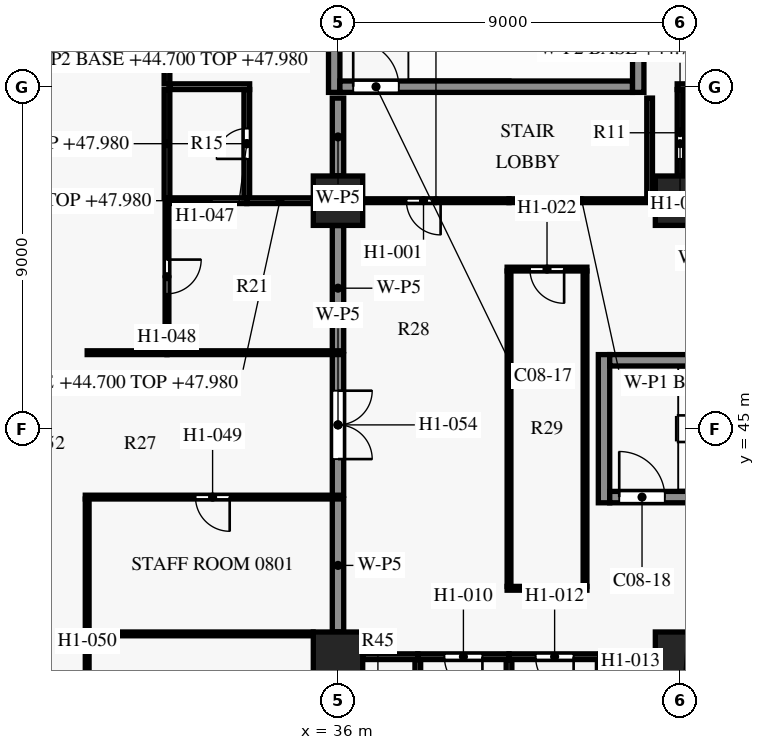
"""IFC4 building model, lengths in metres.
Left out: names, types, materials, properties, quantities, classifications, styles, units other than length and angle.
Written with IfcOpenShell. Run it as: python <this file> out.ifc"""

import sys

from ifc_helpers import new_model, si_unit, direction, frame, frame_2d, origin, origin_2d, place, context, subcontext, project, spatial, rectangle, extrude, element, fill, save


model = new_model("IFC4")
c1 = context("Model", 3, precision=1e-05, world=origin(), true_north=direction((0.0, 1.0)))
c2 = subcontext(c1, "Body", "Model", "MODEL_VIEW")
j1 = project(units=[si_unit("LENGTHUNIT", "METRE"), si_unit("PLANEANGLEUNIT", "RADIAN")], contexts=[c1])
p1 = place(None, origin())
s1 = spatial("IfcSite", under=j1, at=p1, CompositionType="ELEMENT")
p2 = place(p1, origin())
s2 = spatial("IfcBuilding", under=s1, at=p2, CompositionType="ELEMENT")
p3 = place(p2, frame((0.0, 0.0, 44.7)))
s3 = spatial("IfcBuildingStorey", under=s2, at=p3, CompositionType="ELEMENT", Elevation=44.7)
for number, where, z_axis, x_axis in (
    (1, (36.0, 39.0, 0.0), (0.0, 0.0, 1.0), (1.0, 0.0, 0.0)),
    (2, (36.0, 51.0, 0.0), (0.0, 0.0, 1.0), (1.0, 0.0, 0.0)),
    (3, (45.0, 39.0, 0.0), (0.0, 0.0, 1.0), (1.0, 0.0, 0.0)),
    (4, (45.0, 51.0, 0.0), (0.0, 0.0, 1.0), (1.0, 0.0, 0.0)),
):
    element("IfcColumn", number, at=place(p3, frame(where, z_axis=z_axis, x_axis=x_axis)), inside=s3, PredefinedType="COLUMN", context=c2, shape_type="SweptSolid", body=[
        extrude(rectangle(XDim=1.3, YDim=1.3, at=origin_2d()), origin(), (0.0, 0.0, 1.0), 3.6),
    ])
p4 = place(p3, frame((43.15, 43.2, 0.0), z_axis=(0.0, 0.0, 1.0), x_axis=(1.0, 0.0, 0.0)))
e5 = element("IfcWall", 5, at=p4, inside=s3, PredefinedType="SHEAR", context=c2, shape_type="SweptSolid", body=[
    extrude(rectangle(XDim=7.7, YDim=0.3, at=frame_2d((3.85, 0.0))), origin(), (0.0, 0.0, 1.0), 3.3),
])
p5 = place(p4, frame((0.25, 0.0, 0.0)))
e6 = element("IfcOpeningElement", 6, at=p5, cuts=e5, PredefinedType="OPENING", context=c2, shape_type="SweptSolid", body=[
    extrude(rectangle(XDim=1.2, YDim=2.2, at=frame_2d((0.6, 1.1))), frame((0.0, 0.16, 0.0), z_axis=(0.0, -1.0, 0.0), x_axis=(1.0, 0.0, 0.0)), (0.0, 0.0, 1.0), 0.32),
])
p6 = place(p3, frame((43.15, 46.8, 0.0), z_axis=(0.0, 0.0, 1.0), x_axis=(1.0, 0.0, 0.0)))
e7 = element("IfcWall", 7, at=p6, inside=s3, PredefinedType="SHEAR", context=c2, shape_type="SweptSolid", body=[
    extrude(rectangle(XDim=7.7, YDim=0.3, at=frame_2d((3.85, 0.0))), origin(), (0.0, 0.0, 1.0), 3.3),
])
p7 = place(p3, frame((36.05, 54.0, 0.0), z_axis=(0.0, 0.0, 1.0), x_axis=(1.0, 0.0, 0.0)))
e8 = element("IfcWall", 8, at=p7, inside=s3, PredefinedType="SHEAR", context=c2, shape_type="SweptSolid", body=[
    extrude(rectangle(XDim=7.7, YDim=0.3, at=frame_2d((3.85, 0.0))), origin(), (0.0, 0.0, 1.0), 3.3),
])
p8 = place(p7, frame((0.35, 0.0, 0.0)))
e9 = element("IfcOpeningElement", 9, at=p8, cuts=e8, PredefinedType="OPENING", context=c2, shape_type="SweptSolid", body=[
    extrude(rectangle(XDim=1.2, YDim=2.2, at=frame_2d((0.6, 1.1))), frame((0.0, 0.16, 0.0), z_axis=(0.0, -1.0, 0.0), x_axis=(1.0, 0.0, 0.0)), (0.0, 0.0, 1.0), 0.32),
])
for number, where, z_axis, x_axis in (
    (10, (35.9, 53.85, 0.0), (0.0, 0.0, 1.0), (0.0, 1.0, 0.0)),
    (11, (43.0, 43.05, 0.0), (0.0, 0.0, 1.0), (0.0, 1.0, 0.0)),
    (12, (43.9, 53.85, 0.0), (0.0, 0.0, 1.0), (0.0, 1.0, 0.0)),
):
    element("IfcWall", number, at=place(p3, frame(where, z_axis=z_axis, x_axis=x_axis)), inside=s3, PredefinedType="SHEAR", context=c2, shape_type="SweptSolid", body=[
        extrude(rectangle(XDim=3.9, YDim=0.3, at=frame_2d((1.95, 0.0))), origin(), (0.0, 0.0, 1.0), 3.3),
    ])
p9 = place(p3, frame((38.1, 36.075, 0.0), z_axis=(0.0, 0.0, 1.0), x_axis=(0.0, 1.0, 0.0)))
e13 = element("IfcWall", 13, at=p9, inside=s3, PredefinedType="PARTITIONING", context=c2, shape_type="SweptSolid", body=[
    extrude(rectangle(XDim=2.85, YDim=0.15, at=frame_2d((1.425, 0.0))), origin(), (0.0, 0.0, 1.0), 2.58),
])
p10 = place(p9, frame((1.025, 0.0, 0.0)))
e14 = element("IfcOpeningElement", 14, at=p10, cuts=e13, PredefinedType="OPENING", context=c2, shape_type="SweptSolid", body=[
    extrude(rectangle(XDim=0.8, YDim=2.1, at=frame_2d((0.4, 1.05))), frame((0.0, 0.085, 0.0), z_axis=(0.0, -1.0, 0.0), x_axis=(1.0, 0.0, 0.0)), (0.0, 0.0, 1.0), 0.17),
])
p11 = place(p3, frame((40.5, 38.925, 0.0), z_axis=(0.0, 0.0, 1.0), x_axis=(0.0, -1.0, 0.0)))
e15 = element("IfcWall", 15, at=p11, inside=s3, PredefinedType="PARTITIONING", context=c2, shape_type="SweptSolid", body=[
    extrude(rectangle(XDim=11.35, YDim=0.15, at=frame_2d((5.675, 0.0))), origin(), (0.0, 0.0, 1.0), 2.58),
])
p12 = place(p3, frame((42.9, 38.925, 0.0), z_axis=(0.0, 0.0, 1.0), x_axis=(0.0, -1.0, 0.0)))
e16 = element("IfcWall", 16, at=p12, inside=s3, PredefinedType="PARTITIONING", context=c2, shape_type="SweptSolid", body=[
    extrude(rectangle(XDim=2.85, YDim=0.15, at=frame_2d((1.425, 0.0))), origin(), (0.0, 0.0, 1.0), 2.58),
])
p13 = place(p12, frame((1.025, 0.0, 0.0)))
e17 = element("IfcOpeningElement", 17, at=p13, cuts=e16, PredefinedType="OPENING", context=c2, shape_type="SweptSolid", body=[
    extrude(rectangle(XDim=0.8, YDim=2.1, at=frame_2d((0.4, 1.05))), frame((0.0, 0.085, 0.0), z_axis=(0.0, -1.0, 0.0), x_axis=(1.0, 0.0, 0.0)), (0.0, 0.0, 1.0), 0.17),
])
p14 = place(p3, frame((38.1, 39.0, 0.0), z_axis=(0.0, 0.0, 1.0), x_axis=(-1.0, 0.0, 0.0)))
e18 = element("IfcWall", 18, at=p14, inside=s3, PredefinedType="PARTITIONING", context=c2, shape_type="SweptSolid", body=[
    extrude(rectangle(XDim=1.445, YDim=0.15, at=frame_2d((0.723, 0.0))), origin(), (0.0, 0.0, 1.0), 2.58),
])
p15 = place(p3, frame((40.5, 39.0, 0.0), z_axis=(0.0, 0.0, 1.0), x_axis=(-1.0, 0.0, 0.0)))
e19 = element("IfcWall", 19, at=p15, inside=s3, PredefinedType="PARTITIONING", context=c2, shape_type="SweptSolid", body=[
    extrude(rectangle(XDim=2.4, YDim=0.15, at=frame_2d((1.2, 0.0))), origin(), (0.0, 0.0, 1.0), 2.58),
])
p16 = place(p15, frame((0.7, 0.0, 0.0)))
e20 = element("IfcOpeningElement", 20, at=p16, cuts=e19, PredefinedType="OPENING", context=c2, shape_type="SweptSolid", body=[
    extrude(rectangle(XDim=1.0, YDim=2.1, at=frame_2d((0.5, 1.05))), frame((0.0, 0.085, 0.0), z_axis=(0.0, -1.0, 0.0), x_axis=(1.0, 0.0, 0.0)), (0.0, 0.0, 1.0), 0.17),
])
p17 = place(p3, frame((42.9, 39.0, 0.0), z_axis=(0.0, 0.0, 1.0), x_axis=(-1.0, 0.0, 0.0)))
e21 = element("IfcWall", 21, at=p17, inside=s3, PredefinedType="PARTITIONING", context=c2, shape_type="SweptSolid", body=[
    extrude(rectangle(XDim=2.4, YDim=0.15, at=frame_2d((1.2, 0.0))), origin(), (0.0, 0.0, 1.0), 2.58),
])
p18 = place(p17, frame((0.7, 0.0, 0.0)))
e22 = element("IfcOpeningElement", 22, at=p18, cuts=e21, PredefinedType="OPENING", context=c2, shape_type="SweptSolid", body=[
    extrude(rectangle(XDim=1.0, YDim=2.1, at=frame_2d((0.5, 1.05))), frame((0.0, 0.085, 0.0), z_axis=(0.0, -1.0, 0.0), x_axis=(1.0, 0.0, 0.0)), (0.0, 0.0, 1.0), 0.17),
])
p19 = place(p3, frame((44.345, 39.0, 0.0), z_axis=(0.0, 0.0, 1.0), x_axis=(-1.0, 0.0, 0.0)))
e23 = element("IfcWall", 23, at=p19, inside=s3, PredefinedType="PARTITIONING", context=c2, shape_type="SweptSolid", body=[
    extrude(rectangle(XDim=1.445, YDim=0.15, at=frame_2d((0.723, 0.0))), origin(), (0.0, 0.0, 1.0), 2.58),
])
p20 = place(p3, frame((29.4, 39.55, 0.0), z_axis=(0.0, 0.0, 1.0), x_axis=(0.0, -1.0, 0.0)))
e24 = element("IfcWall", 24, at=p20, inside=s3, PredefinedType="PARTITIONING", context=c2, shape_type="SweptSolid", body=[
    extrude(rectangle(XDim=3.5, YDim=0.1, at=frame_2d((1.75, 0.0))), origin(), (0.0, 0.0, 1.0), 3.28),
])
p21 = place(p20, frame((1.3, 0.0, 0.0)))
e25 = element("IfcOpeningElement", 25, at=p21, cuts=e24, PredefinedType="OPENING", context=c2, shape_type="SweptSolid", body=[
    extrude(rectangle(XDim=0.9, YDim=2.1, at=frame_2d((0.45, 1.05))), frame((0.0, 0.06, 0.0), z_axis=(0.0, -1.0, 0.0), x_axis=(1.0, 0.0, 0.0)), (0.0, 0.0, 1.0), 0.12),
])
p22 = place(p3, frame((35.345, 39.6, 0.0), z_axis=(0.0, 0.0, 1.0), x_axis=(-1.0, 0.0, 0.0)))
e26 = element("IfcWall", 26, at=p22, inside=s3, PredefinedType="PARTITIONING", context=c2, shape_type="SweptSolid", body=[
    extrude(rectangle(XDim=5.895, YDim=0.1, at=frame_2d((2.948, 0.0))), origin(), (0.0, 0.0, 1.0), 3.28),
])
p23 = place(p3, frame((40.45, 40.8, 0.0), z_axis=(0.0, 0.0, 1.0), x_axis=(1.0, 0.0, 0.0)))
e27 = element("IfcWall", 27, at=p23, inside=s3, PredefinedType="PARTITIONING", context=c2, shape_type="SweptSolid", body=[
    extrude(rectangle(XDim=2.1, YDim=0.1, at=frame_2d((1.05, 0.0))), origin(), (0.0, 0.0, 1.0), 3.28),
])
p24 = place(p3, frame((29.4, 43.15, 0.0), z_axis=(0.0, 0.0, 1.0), x_axis=(0.0, -1.0, 0.0)))
e28 = element("IfcWall", 28, at=p24, inside=s3, PredefinedType="PARTITIONING", context=c2, shape_type="SweptSolid", body=[
    extrude(rectangle(XDim=3.5, YDim=0.1, at=frame_2d((1.75, 0.0))), origin(), (0.0, 0.0, 1.0), 3.28),
])
p25 = place(p3, frame((36.0, 43.15, 0.0), z_axis=(0.0, 0.0, 1.0), x_axis=(0.0, -1.0, 0.0)))
e29 = element("IfcWall", 29, at=p25, inside=s3, PredefinedType="PARTITIONING", context=c2, shape_type="SweptSolid", body=[
    extrude(rectangle(XDim=3.495, YDim=0.3, at=frame_2d((1.748, 0.0))), origin(), (0.0, 0.0, 1.0), 2.58),
])
p26 = place(p3, frame((35.85, 43.2, 0.0), z_axis=(0.0, 0.0, 1.0), x_axis=(-1.0, 0.0, 0.0)))
e30 = element("IfcWall", 30, at=p26, inside=s3, PredefinedType="PARTITIONING", context=c2, shape_type="SweptSolid", body=[
    extrude(rectangle(XDim=6.5, YDim=0.1, at=frame_2d((3.25, 0.0))), origin(), (0.0, 0.0, 1.0), 3.28),
])
p27 = place(p26, frame((2.7, 0.0, 0.0)))
e31 = element("IfcOpeningElement", 31, at=p27, cuts=e30, PredefinedType="OPENING", context=c2, shape_type="SweptSolid", body=[
    extrude(rectangle(XDim=0.9, YDim=2.1, at=frame_2d((0.45, 1.05))), frame((0.0, 0.06, 0.0), z_axis=(0.0, -1.0, 0.0), x_axis=(1.0, 0.0, 0.0)), (0.0, 0.0, 1.0), 0.12),
])
p28 = place(p3, frame((36.0, 46.95, 0.0), z_axis=(0.0, 0.0, 1.0), x_axis=(0.0, -1.0, 0.0)))
e32 = element("IfcWall", 32, at=p28, inside=s3, PredefinedType="PARTITIONING", context=c2, shape_type="SweptSolid", body=[
    extrude(rectangle(XDim=3.7, YDim=0.3, at=frame_2d((1.85, 0.0))), origin(), (0.0, 0.0, 1.0), 2.58),
])
p29 = place(p28, frame((0.95, 0.0, 0.0)))
e33 = element("IfcOpeningElement", 33, at=p29, cuts=e32, PredefinedType="OPENING", context=c2, shape_type="SweptSolid", body=[
    extrude(rectangle(XDim=1.8, YDim=2.1, at=frame_2d((0.9, 1.05))), frame((0.0, 0.16, 0.0), z_axis=(0.0, -1.0, 0.0), x_axis=(1.0, 0.0, 0.0)), (0.0, 0.0, 1.0), 0.32),
])
p30 = place(p3, frame((29.4, 47.0, 0.0), z_axis=(0.0, 0.0, 1.0), x_axis=(1.0, 0.0, 0.0)))
e34 = element("IfcWall", 34, at=p30, inside=s3, PredefinedType="PARTITIONING", context=c2, shape_type="SweptSolid", body=[
    extrude(rectangle(XDim=2.1, YDim=0.1, at=frame_2d((1.05, 0.0))), origin(), (0.0, 0.0, 1.0), 3.28),
])
p31 = place(p3, frame((31.5, 47.0, 0.0), z_axis=(0.0, 0.0, 1.0), x_axis=(1.0, 0.0, 0.0)))
e35 = element("IfcWall", 35, at=p31, inside=s3, PredefinedType="PARTITIONING", context=c2, shape_type="SweptSolid", body=[
    extrude(rectangle(XDim=4.35, YDim=0.1, at=frame_2d((2.175, 0.0))), origin(), (0.0, 0.0, 1.0), 3.28),
])
for number, where, z_axis, x_axis in (
    (36, (40.5, 49.15, 0.0), (0.0, 0.0, 1.0), (0.0, -1.0, 0.0)),
    (37, (42.5, 49.15, 0.0), (0.0, 0.0, 1.0), (0.0, -1.0, 0.0)),
):
    element("IfcWall", number, at=place(p3, frame(where, z_axis=z_axis, x_axis=x_axis)), inside=s3, PredefinedType="PARTITIONING", context=c2, shape_type="SweptSolid", body=[
        extrude(rectangle(XDim=8.3, YDim=0.1, at=frame_2d((4.15, 0.0))), origin(), (0.0, 0.0, 1.0), 3.28),
    ])
p32 = place(p3, frame((42.55, 49.2, 0.0), z_axis=(0.0, 0.0, 1.0), x_axis=(-1.0, 0.0, 0.0)))
e38 = element("IfcWall", 38, at=p32, inside=s3, PredefinedType="PARTITIONING", context=c2, shape_type="SweptSolid", body=[
    extrude(rectangle(XDim=2.1, YDim=0.1, at=frame_2d((1.05, 0.0))), origin(), (0.0, 0.0, 1.0), 3.28),
])
p33 = place(p32, frame((0.6, 0.0, 0.0)))
e39 = element("IfcOpeningElement", 39, at=p33, cuts=e38, PredefinedType="OPENING", context=c2, shape_type="SweptSolid", body=[
    extrude(rectangle(XDim=0.9, YDim=2.1, at=frame_2d((0.45, 1.05))), frame((0.0, 0.06, 0.0), z_axis=(0.0, -1.0, 0.0), x_axis=(1.0, 0.0, 0.0)), (0.0, 0.0, 1.0), 0.12),
])
p34 = place(p3, frame((36.0, 50.345, 0.0), z_axis=(0.0, 0.0, 1.0), x_axis=(0.0, -1.0, 0.0)))
e40 = element("IfcWall", 40, at=p34, inside=s3, PredefinedType="PARTITIONING", context=c2, shape_type="SweptSolid", body=[
    extrude(rectangle(XDim=3.295, YDim=0.3, at=frame_2d((1.647, 0.0))), origin(), (0.0, 0.0, 1.0), 2.58),
])
p35 = place(p3, frame((31.5, 50.925, 0.0), z_axis=(0.0, 0.0, 1.0), x_axis=(0.0, -1.0, 0.0)))
e41 = element("IfcWall", 41, at=p35, inside=s3, PredefinedType="PARTITIONING", context=c2, shape_type="SweptSolid", body=[
    extrude(rectangle(XDim=3.875, YDim=0.1, at=frame_2d((1.938, 0.0))), origin(), (0.0, 0.0, 1.0), 3.28),
])
p36 = place(p35, frame((1.475, 0.0, 0.0)))
e42 = element("IfcOpeningElement", 42, at=p36, cuts=e41, PredefinedType="OPENING", context=c2, shape_type="SweptSolid", body=[
    extrude(rectangle(XDim=0.9, YDim=2.1, at=frame_2d((0.45, 1.05))), frame((0.0, 0.06, 0.0), z_axis=(0.0, -1.0, 0.0), x_axis=(1.0, 0.0, 0.0)), (0.0, 0.0, 1.0), 0.12),
])
p37 = place(p3, frame((31.575, 51.0, 0.0), z_axis=(0.0, 0.0, 1.0), x_axis=(1.0, 0.0, 0.0)))
e43 = element("IfcWall", 43, at=p37, inside=s3, PredefinedType="PARTITIONING", context=c2, shape_type="SweptSolid", body=[
    extrude(rectangle(XDim=2.025, YDim=0.15, at=frame_2d((1.013, 0.0))), origin(), (0.0, 0.0, 1.0), 3.28),
])
p38 = place(p3, frame((33.6, 51.0, 0.0), z_axis=(0.0, 0.0, 1.0), x_axis=(1.0, 0.0, 0.0)))
e44 = element("IfcWall", 44, at=p38, inside=s3, PredefinedType="PARTITIONING", context=c2, shape_type="SweptSolid", body=[
    extrude(rectangle(XDim=1.745, YDim=0.15, at=frame_2d((0.873, 0.0))), origin(), (0.0, 0.0, 1.0), 3.28),
])
p39 = place(p3, frame((40.5, 51.0, 0.0), z_axis=(0.0, 0.0, 1.0), x_axis=(-1.0, 0.0, 0.0)))
e45 = element("IfcWall", 45, at=p39, inside=s3, PredefinedType="PARTITIONING", context=c2, shape_type="SweptSolid", body=[
    extrude(rectangle(XDim=3.845, YDim=0.1, at=frame_2d((1.922, 0.0))), origin(), (0.0, 0.0, 1.0), 2.58),
])
p40 = place(p39, frame((1.8, 0.0, 0.0)))
e46 = element("IfcOpeningElement", 46, at=p40, cuts=e45, PredefinedType="OPENING", context=c2, shape_type="SweptSolid", body=[
    extrude(rectangle(XDim=0.9, YDim=2.1, at=frame_2d((0.45, 1.05))), frame((0.0, 0.06, 0.0), z_axis=(0.0, -1.0, 0.0), x_axis=(1.0, 0.0, 0.0)), (0.0, 0.0, 1.0), 0.12),
])
p41 = place(p3, frame((44.33, 51.0, 0.0), z_axis=(0.0, 0.0, 1.0), x_axis=(-1.0, 0.0, 0.0)))
e47 = element("IfcWall", 47, at=p41, inside=s3, PredefinedType="PARTITIONING", context=c2, shape_type="SweptSolid", body=[
    extrude(rectangle(XDim=3.83, YDim=0.1, at=frame_2d((1.915, 0.0))), origin(), (0.0, 0.0, 1.0), 2.58),
])
p42 = place(p3, frame((33.6, 51.075, 0.0), z_axis=(0.0, 0.0, 1.0), x_axis=(0.0, 1.0, 0.0)))
e48 = element("IfcWall", 48, at=p42, inside=s3, PredefinedType="PARTITIONING", context=c2, shape_type="SweptSolid", body=[
    extrude(rectangle(XDim=2.85, YDim=0.15, at=frame_2d((1.425, 0.0))), origin(), (0.0, 0.0, 1.0), 3.28),
])
p43 = place(p42, frame((1.025, 0.0, 0.0)))
e49 = element("IfcOpeningElement", 49, at=p43, cuts=e48, PredefinedType="OPENING", context=c2, shape_type="SweptSolid", body=[
    extrude(rectangle(XDim=0.8, YDim=2.1, at=frame_2d((0.4, 1.05))), frame((0.0, 0.085, 0.0), z_axis=(0.0, -1.0, 0.0), x_axis=(1.0, 0.0, 0.0)), (0.0, 0.0, 1.0), 0.17),
])
p44 = place(p3, frame((36.0, 53.7, 0.0), z_axis=(0.0, 0.0, 1.0), x_axis=(0.0, -1.0, 0.0)))
e50 = element("IfcWall", 50, at=p44, inside=s3, PredefinedType="PARTITIONING", context=c2, shape_type="SweptSolid", body=[
    extrude(rectangle(XDim=2.045, YDim=0.3, at=frame_2d((1.022, 0.0))), origin(), (0.0, 0.0, 1.0), 2.58),
])
p45 = place(p3, frame((44.2, 53.7, 0.0), z_axis=(0.0, 0.0, 1.0), x_axis=(0.0, -1.0, 0.0)))
e51 = element("IfcWall", 51, at=p45, inside=s3, PredefinedType="PARTITIONING", context=c2, shape_type="SweptSolid", body=[
    extrude(rectangle(XDim=2.625, YDim=0.15, at=frame_2d((1.312, 0.0))), origin(), (0.0, 0.0, 1.0), 2.58),
])
p46 = place(p3, frame((31.5, 53.925, 0.0), z_axis=(0.0, 0.0, 1.0), x_axis=(0.0, -1.0, 0.0)))
e52 = element("IfcWall", 52, at=p46, inside=s3, PredefinedType="PARTITIONING", context=c2, shape_type="SweptSolid", body=[
    extrude(rectangle(XDim=2.85, YDim=0.15, at=frame_2d((1.425, 0.0))), origin(), (0.0, 0.0, 1.0), 3.28),
])
p47 = place(p3, frame((45.0, 53.925, 0.0), z_axis=(0.0, 0.0, 1.0), x_axis=(0.0, -1.0, 0.0)))
e53 = element("IfcWall", 53, at=p47, inside=s3, PredefinedType="PARTITIONING", context=c2, shape_type="SweptSolid", body=[
    extrude(rectangle(XDim=2.27, YDim=0.15, at=frame_2d((1.135, 0.0))), origin(), (0.0, 0.0, 1.0), 2.73),
])
p48 = place(p47, frame((1.025, 0.0, 0.0)))
e54 = element("IfcOpeningElement", 54, at=p48, cuts=e53, PredefinedType="OPENING", context=c2, shape_type="SweptSolid", body=[
    extrude(rectangle(XDim=0.8, YDim=2.1, at=frame_2d((0.4, 1.05))), frame((0.0, 0.085, 0.0), z_axis=(0.0, -1.0, 0.0), x_axis=(1.0, 0.0, 0.0)), (0.0, 0.0, 1.0), 0.17),
])
p49 = place(p3, frame((33.675, 54.0, 0.0), z_axis=(0.0, 0.0, 1.0), x_axis=(-1.0, 0.0, 0.0)))
e55 = element("IfcWall", 55, at=p49, inside=s3, PredefinedType="PARTITIONING", context=c2, shape_type="SweptSolid", body=[
    extrude(rectangle(XDim=2.1, YDim=0.15, at=frame_2d((1.05, 0.0))), origin(), (0.0, 0.0, 1.0), 3.28),
])
p50 = place(p3, frame((47.175, 54.0, 0.0), z_axis=(0.0, 0.0, 1.0), x_axis=(-1.0, 0.0, 0.0)))
e56 = element("IfcWall", 56, at=p50, inside=s3, PredefinedType="PARTITIONING", context=c2, shape_type="SweptSolid", body=[
    extrude(rectangle(XDim=2.25, YDim=0.15, at=frame_2d((1.125, 0.0))), origin(), (0.0, 0.0, 1.0), 2.73),
])
p51 = place(p3, frame((31.5, 62.425, 0.0), z_axis=(0.0, 0.0, 1.0), x_axis=(0.0, -1.0, 0.0)))
e57 = element("IfcWall", 57, at=p51, inside=s3, PredefinedType="PARTITIONING", context=c2, shape_type="SweptSolid", body=[
    extrude(rectangle(XDim=8.35, YDim=0.15, at=frame_2d((4.175, 0.0))), origin(), (0.0, 0.0, 1.0), 3.28),
])
p52 = place(p51, frame((3.925, 0.0, 0.0)))
e58 = element("IfcOpeningElement", 58, at=p52, cuts=e57, PredefinedType="OPENING", context=c2, shape_type="SweptSolid", body=[
    extrude(rectangle(XDim=1.0, YDim=2.1, at=frame_2d((0.5, 1.05))), frame((0.0, 0.085, 0.0), z_axis=(0.0, -1.0, 0.0), x_axis=(1.0, 0.0, 0.0)), (0.0, 0.0, 1.0), 0.17),
])
p53 = place(p8, origin())
e59 = element("IfcDoor", 59, at=p53, inside=s3, OperationType="SINGLE_SWING_LEFT", PredefinedType="DOOR", context=c2, shape_type="SweptSolid", body=[
    extrude(rectangle(XDim=1.2, YDim=2.2, at=frame_2d((0.6, 1.1))), frame((0.0, 0.025, 0.0), z_axis=(0.0, -1.0, 0.0), x_axis=(1.0, 0.0, 0.0)), (0.0, 0.0, 1.0), 0.05),
])
fill(e9, e59)
p54 = place(p5, origin())
e60 = element("IfcDoor", 60, at=p54, inside=s3, OperationType="SINGLE_SWING_RIGHT", PredefinedType="DOOR", context=c2, shape_type="SweptSolid", body=[
    extrude(rectangle(XDim=1.2, YDim=2.2, at=frame_2d((0.6, 1.1))), frame((0.0, 0.025, 0.0), z_axis=(0.0, -1.0, 0.0), x_axis=(1.0, 0.0, 0.0)), (0.0, 0.0, 1.0), 0.05),
])
fill(e6, e60)
p55 = place(p40, origin())
e61 = element("IfcDoor", 61, at=p55, inside=s3, OperationType="SINGLE_SWING_LEFT", PredefinedType="DOOR", context=c2, shape_type="SweptSolid", body=[
    extrude(rectangle(XDim=0.9, YDim=2.1, at=frame_2d((0.45, 1.05))), frame((0.0, 0.025, 0.0), z_axis=(0.0, -1.0, 0.0), x_axis=(1.0, 0.0, 0.0)), (0.0, 0.0, 1.0), 0.05),
])
fill(e46, e61)
p56 = place(p48, origin())
e62 = element("IfcDoor", 62, at=p56, inside=s3, OperationType="SINGLE_SWING_RIGHT", PredefinedType="DOOR", context=c2, shape_type="SweptSolid", body=[
    extrude(rectangle(XDim=0.8, YDim=2.1, at=frame_2d((0.4, 1.05))), frame((0.0, 0.025, 0.0), z_axis=(0.0, -1.0, 0.0), x_axis=(1.0, 0.0, 0.0)), (0.0, 0.0, 1.0), 0.05),
])
fill(e54, e62)
p57 = place(p16, origin())
e63 = element("IfcDoor", 63, at=p57, inside=s3, OperationType="SINGLE_SWING_LEFT", PredefinedType="DOOR", context=c2, shape_type="SweptSolid", body=[
    extrude(rectangle(XDim=1.0, YDim=2.1, at=frame_2d((0.5, 1.05))), frame((0.0, 0.025, 0.0), z_axis=(0.0, -1.0, 0.0), x_axis=(1.0, 0.0, 0.0)), (0.0, 0.0, 1.0), 0.05),
])
fill(e20, e63)
p58 = place(p18, origin())
e64 = element("IfcDoor", 64, at=p58, inside=s3, OperationType="SINGLE_SWING_LEFT", PredefinedType="DOOR", context=c2, shape_type="SweptSolid", body=[
    extrude(rectangle(XDim=1.0, YDim=2.1, at=frame_2d((0.5, 1.05))), frame((0.0, 0.025, 0.0), z_axis=(0.0, -1.0, 0.0), x_axis=(1.0, 0.0, 0.0)), (0.0, 0.0, 1.0), 0.05),
])
fill(e22, e64)
p59 = place(p33, origin())
e65 = element("IfcDoor", 65, at=p59, inside=s3, OperationType="SINGLE_SWING_LEFT", PredefinedType="DOOR", context=c2, shape_type="SweptSolid", body=[
    extrude(rectangle(XDim=0.9, YDim=2.1, at=frame_2d((0.45, 1.05))), frame((0.0, 0.025, 0.0), z_axis=(0.0, -1.0, 0.0), x_axis=(1.0, 0.0, 0.0)), (0.0, 0.0, 1.0), 0.05),
])
fill(e39, e65)
p60 = place(p43, origin())
e66 = element("IfcDoor", 66, at=p60, inside=s3, OperationType="SINGLE_SWING_LEFT", PredefinedType="DOOR", context=c2, shape_type="SweptSolid", body=[
    extrude(rectangle(XDim=0.8, YDim=2.1, at=frame_2d((0.4, 1.05))), frame((0.0, 0.025, 0.0), z_axis=(0.0, -1.0, 0.0), x_axis=(1.0, 0.0, 0.0)), (0.0, 0.0, 1.0), 0.05),
])
fill(e49, e66)
p61 = place(p36, origin())
e67 = element("IfcDoor", 67, at=p61, inside=s3, OperationType="SINGLE_SWING_LEFT", PredefinedType="DOOR", context=c2, shape_type="SweptSolid", body=[
    extrude(rectangle(XDim=0.9, YDim=2.1, at=frame_2d((0.45, 1.05))), frame((0.0, 0.025, 0.0), z_axis=(0.0, -1.0, 0.0), x_axis=(1.0, 0.0, 0.0)), (0.0, 0.0, 1.0), 0.05),
])
fill(e42, e67)
p62 = place(p27, origin())
e68 = element("IfcDoor", 68, at=p62, inside=s3, OperationType="SINGLE_SWING_LEFT", PredefinedType="DOOR", context=c2, shape_type="SweptSolid", body=[
    extrude(rectangle(XDim=0.9, YDim=2.1, at=frame_2d((0.45, 1.05))), frame((0.0, 0.025, 0.0), z_axis=(0.0, -1.0, 0.0), x_axis=(1.0, 0.0, 0.0)), (0.0, 0.0, 1.0), 0.05),
])
fill(e31, e68)
p63 = place(p29, origin())
e69 = element("IfcDoor", 69, at=p63, inside=s3, OperationType="DOUBLE_DOOR_SINGLE_SWING", PredefinedType="DOOR", context=c2, shape_type="SweptSolid", body=[
    extrude(rectangle(XDim=1.8, YDim=2.1, at=frame_2d((0.9, 1.05))), frame((0.0, 0.025, 0.0), z_axis=(0.0, -1.0, 0.0), x_axis=(1.0, 0.0, 0.0)), (0.0, 0.0, 1.0), 0.05),
])
fill(e33, e69)
save(model, sys.argv[1])
